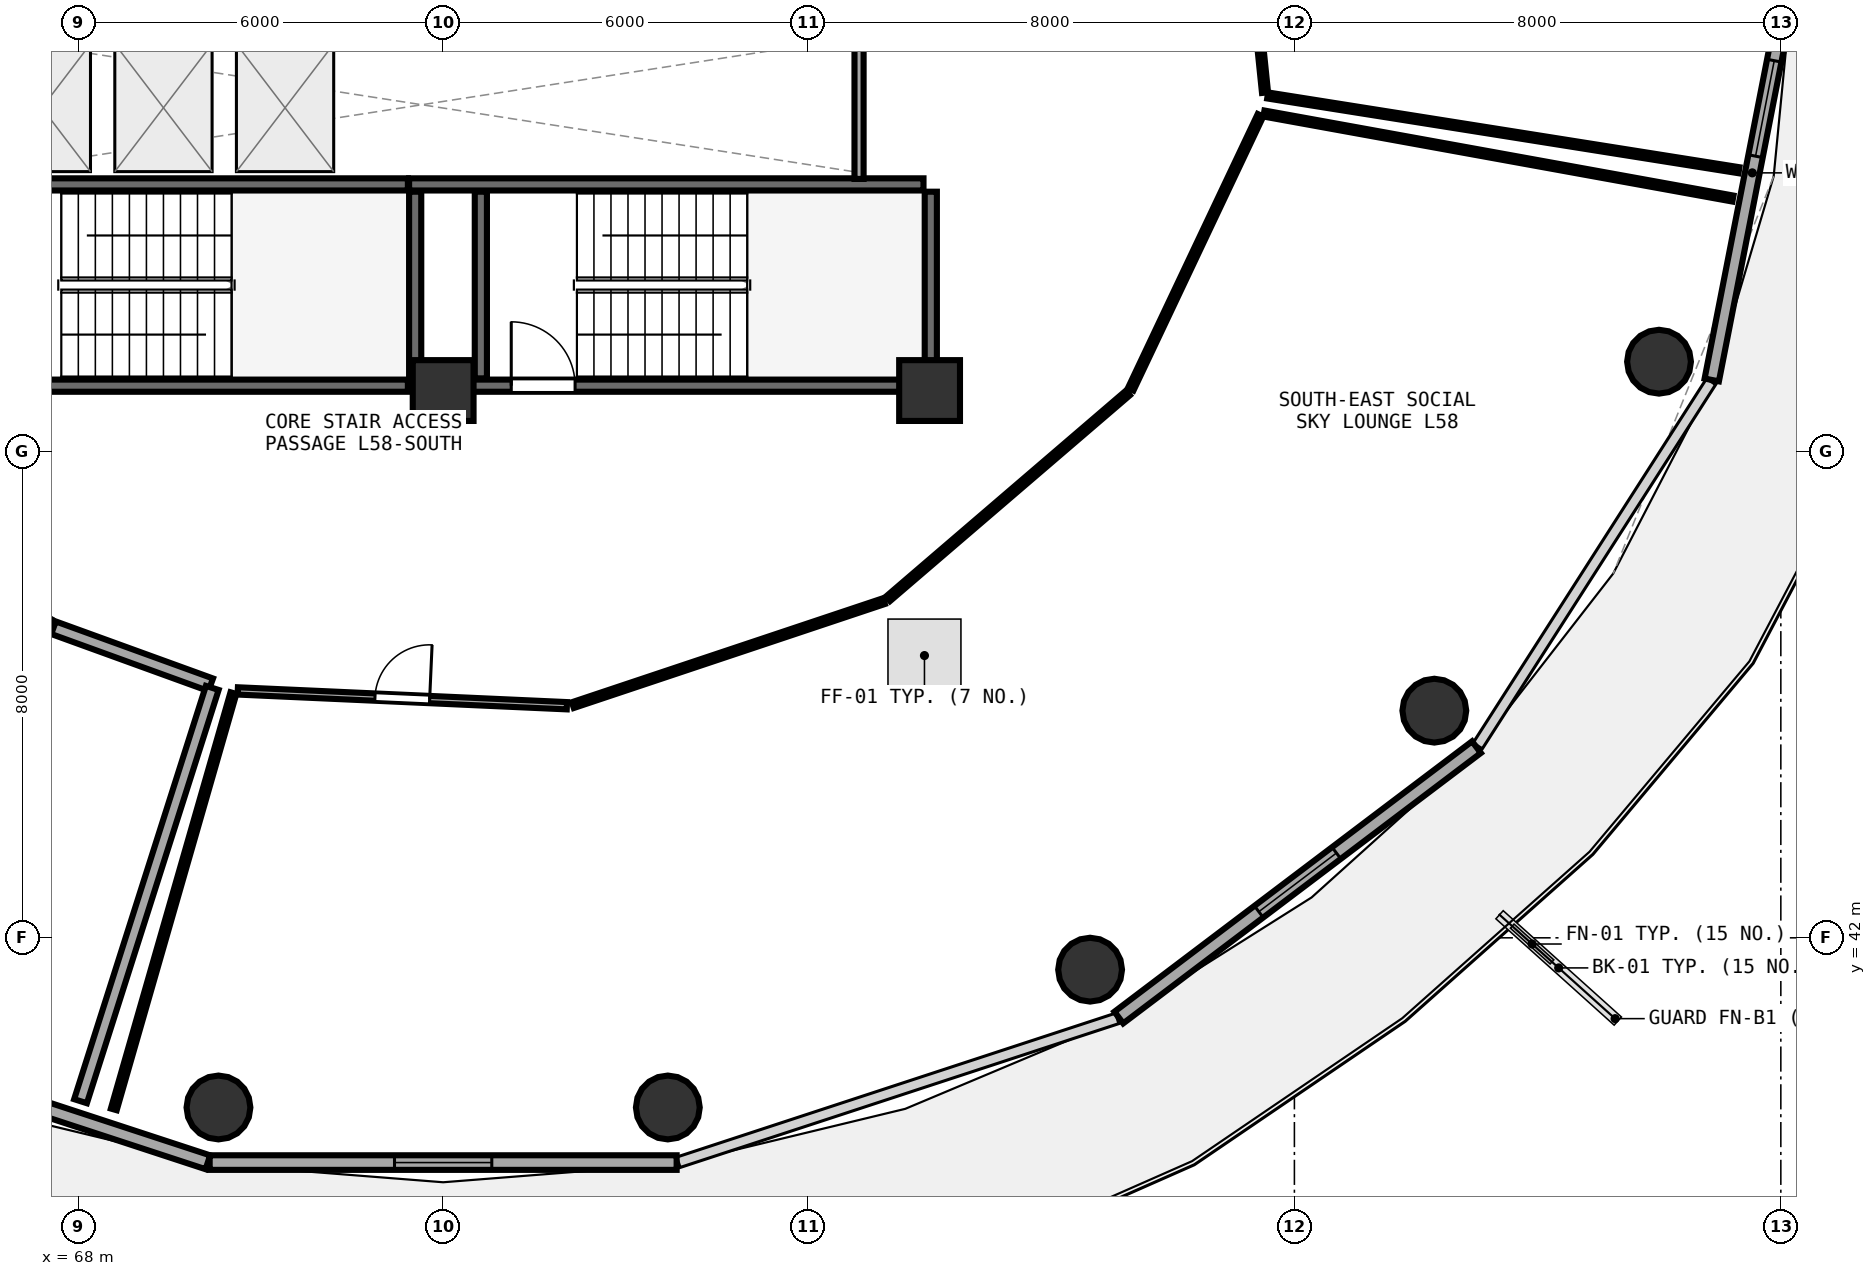
"""IFC4 building model, lengths in metres.
Left out: names, types, materials, properties, quantities, classifications, styles, units other than length and angle.
Written with IfcOpenShell. Run it as: python <this file> out.ifc"""

import sys

from ifc_helpers import new_model, si_unit, direction, frame, frame_2d, origin, origin_2d, place, context, subcontext, project, spatial, rectangle, circle, extrude, element, fill, save


model = new_model("IFC4")
c1 = context("Model", 3, precision=1e-05, world=origin(), true_north=direction((0.0, 1.0)))
c2 = subcontext(c1, "Body", "Model", "MODEL_VIEW")
j1 = project(units=[si_unit("LENGTHUNIT", "METRE"), si_unit("PLANEANGLEUNIT", "RADIAN")], contexts=[c1])
p1 = place(None, origin())
s1 = spatial("IfcSite", under=j1, at=p1, CompositionType="ELEMENT")
p2 = place(p1, origin())
s2 = spatial("IfcBuilding", under=s1, at=p2, CompositionType="ELEMENT")
p3 = place(p2, frame((0.0, 0.0, 226.95)))
s3 = spatial("IfcBuildingStorey", under=s2, at=p3, CompositionType="ELEMENT", Elevation=226.95)
for number, where, z_axis, x_axis in (
    (1, (74.0, 51.0, 0.0), (0.0, 0.0, 1.0), (1.0, 0.0, 0.0)),
    (2, (82.0, 51.0, 0.0), (0.0, 0.0, 1.0), (1.0, 0.0, 0.0)),
):
    element("IfcColumn", number, at=place(p3, frame(where, z_axis=z_axis, x_axis=x_axis)), inside=s3, PredefinedType="PILASTER", context=c2, shape_type="SweptSolid", body=[
        extrude(rectangle(XDim=1.0, YDim=1.0, at=origin_2d()), origin(), (0.0, 0.0, 1.0), 3.75),
    ])
for number, where, z_axis, x_axis in (
    (3, (70.305, 39.21, 0.0), (0.0, 0.0, 1.0), (1.0, 0.0, 0.0)),
    (4, (77.695, 39.21, 0.0), (0.0, 0.0, 1.0), (1.0, 0.0, 0.0)),
    (5, (84.64, 41.476, 0.0), (0.0, 0.0, 1.0), (1.0, 0.0, 0.0)),
    (6, (90.302, 45.736, 0.0), (0.0, 0.0, 1.0), (1.0, 0.0, 0.0)),
    (7, (93.997, 51.474, 0.0), (0.0, 0.0, 1.0), (1.0, 0.0, 0.0)),
):
    element("IfcColumn", number, at=place(p3, frame(where, z_axis=z_axis, x_axis=x_axis)), inside=s3, PredefinedType="COLUMN", context=c2, shape_type="SweptSolid", body=[
        extrude(circle(Radius=0.525, at=origin_2d()), origin(), (0.0, 0.0, 1.0), 3.75),
    ])
p4 = place(p3, frame((62.914, 40.675, 0.0), z_axis=(0.0, 0.0, 1.0), x_axis=(0.95022142767, -0.31157541366, 0.0)))
e8 = element("IfcWall", 8, at=p4, inside=s3, PredefinedType="SOLIDWALL", context=c2, shape_type="SweptSolid", body=[
    extrude(rectangle(XDim=7.594, YDim=0.24, at=frame_2d((3.797, 0.0))), origin(), (0.0, 0.0, 1.0), 3.475),
])
p5 = place(p4, frame((2.997, 0.0, 0.85)))
e9 = element("IfcOpeningElement", 9, at=p5, cuts=e8, PredefinedType="OPENING", context=c2, shape_type="SweptSolid", body=[
    extrude(rectangle(XDim=1.6, YDim=1.45, at=frame_2d((0.8, 0.725))), frame((0.0, 0.13, 0.0), z_axis=(0.0, -1.0, 0.0), x_axis=(1.0, 0.0, 0.0)), (0.0, 0.0, 1.0), 0.26),
])
p6 = place(p3, frame((70.16, 38.304, 0.0), z_axis=(0.0, 0.0, 1.0), x_axis=(1.0, 0.0, 0.0)))
e10 = element("IfcWall", 10, at=p6, inside=s3, PredefinedType="SOLIDWALL", context=c2, shape_type="SweptSolid", body=[
    extrude(rectangle(XDim=7.68, YDim=0.24, at=frame_2d((3.84, 0.0))), origin(), (0.0, 0.0, 1.0), 3.475),
])
p7 = place(p6, frame((3.04, 0.0, 0.85)))
e11 = element("IfcOpeningElement", 11, at=p7, cuts=e10, PredefinedType="OPENING", context=c2, shape_type="SweptSolid", body=[
    extrude(rectangle(XDim=1.6, YDim=1.45, at=frame_2d((0.8, 0.725))), frame((0.0, 0.13, 0.0), z_axis=(0.0, -1.0, 0.0), x_axis=(1.0, 0.0, 0.0)), (0.0, 0.0, 1.0), 0.26),
])
p8 = place(p3, frame((85.112, 40.688, 0.0), z_axis=(0.0, 0.0, 1.0), x_axis=(0.797701674595, 0.603052268338, 0.0)))
e12 = element("IfcWall", 12, at=p8, inside=s3, PredefinedType="SOLIDWALL", context=c2, shape_type="SweptSolid", body=[
    extrude(rectangle(XDim=7.374, YDim=0.24, at=frame_2d((3.687, 0.0))), origin(), (0.0, 0.0, 1.0), 3.475),
])
p9 = place(p8, frame((2.887, 0.0, 0.85)))
e13 = element("IfcOpeningElement", 13, at=p9, cuts=e12, PredefinedType="OPENING", context=c2, shape_type="SweptSolid", body=[
    extrude(rectangle(XDim=1.6, YDim=1.45, at=frame_2d((0.8, 0.725))), frame((0.0, 0.13, 0.0), z_axis=(0.0, -1.0, 0.0), x_axis=(1.0, 0.0, 0.0)), (0.0, 0.0, 1.0), 0.26),
])
p10 = place(p3, frame((94.864, 51.174, 0.0), z_axis=(0.0, 0.0, 1.0), x_axis=(0.192069055673, 0.981381413036, 0.0)))
e14 = element("IfcWall", 14, at=p10, inside=s3, PredefinedType="SOLIDWALL", context=c2, shape_type="SweptSolid", body=[
    extrude(rectangle(XDim=6.94, YDim=0.24, at=frame_2d((3.47, 0.0))), origin(), (0.0, 0.0, 1.0), 3.475),
])
p11 = place(p10, frame((3.75, 0.0, 0.85)))
e15 = element("IfcOpeningElement", 15, at=p11, cuts=e14, PredefinedType="OPENING", context=c2, shape_type="SweptSolid", body=[
    extrude(rectangle(XDim=1.6, YDim=1.45, at=frame_2d((0.8, 0.725))), frame((0.0, 0.13, 0.0), z_axis=(0.0, -1.0, 0.0), x_axis=(1.0, 0.0, 0.0)), (0.0, 0.0, 1.0), 0.26),
])
p12 = place(p3, frame((74.0, 51.08, 0.0), z_axis=(0.0, 0.0, 1.0), x_axis=(1.0, 0.0, 0.0)))
e16 = element("IfcWall", 16, at=p12, inside=s3, PredefinedType="SHEAR", context=c2, shape_type="SweptSolid", body=[
    extrude(rectangle(XDim=7.9, YDim=0.2, at=frame_2d((3.95, 0.0))), origin(), (0.0, 0.0, 1.0), 3.49),
])
p13 = place(p12, frame((1.12, 0.0, 0.0)))
e17 = element("IfcOpeningElement", 17, at=p13, cuts=e16, PredefinedType="OPENING", context=c2, shape_type="SweptSolid", body=[
    extrude(rectangle(XDim=1.05, YDim=2.1, at=frame_2d((0.525, 1.05))), frame((0.0, 0.11, 0.0), z_axis=(0.0, -1.0, 0.0), x_axis=(1.0, 0.0, 0.0)), (0.0, 0.0, 1.0), 0.22),
])
p14 = place(p3, frame((82.02, 51.2, 0.0), z_axis=(0.0, 0.0, 1.0), x_axis=(0.0, 1.0, 0.0)))
e18 = element("IfcWall", 18, at=p14, inside=s3, PredefinedType="SHEAR", context=c2, shape_type="SweptSolid", body=[
    extrude(rectangle(XDim=3.07, YDim=0.2, at=frame_2d((1.535, 0.0))), origin(), (0.0, 0.0, 1.0), 3.49),
])
p15 = place(p3, frame((81.9, 54.39, 0.0), z_axis=(0.0, 0.0, 1.0), x_axis=(-1.0, 0.0, 0.0)))
e19 = element("IfcWall", 19, at=p15, inside=s3, PredefinedType="SHEAR", context=c2, shape_type="SweptSolid", body=[
    extrude(rectangle(XDim=8.46, YDim=0.2, at=frame_2d((4.23, 0.0))), origin(), (0.0, 0.0, 1.0), 3.49),
])
p16 = place(p3, frame((74.62, 54.27, 0.0), z_axis=(0.0, 0.0, 1.0), x_axis=(0.0, -1.0, 0.0)))
e20 = element("IfcWall", 20, at=p16, inside=s3, PredefinedType="SHEAR", context=c2, shape_type="SweptSolid", body=[
    extrude(rectangle(XDim=3.07, YDim=0.2, at=frame_2d((1.535, 0.0))), origin(), (0.0, 0.0, 1.0), 3.49),
])
p17 = place(p3, frame((66.26, 51.08, 0.0), z_axis=(0.0, 0.0, 1.0), x_axis=(1.0, 0.0, 0.0)))
e21 = element("IfcWall", 21, at=p17, inside=s3, PredefinedType="SHEAR", context=c2, shape_type="SweptSolid", body=[
    extrude(rectangle(XDim=7.16, YDim=0.2, at=frame_2d((3.58, 0.0))), origin(), (0.0, 0.0, 1.0), 3.49),
])
p18 = place(p3, frame((73.54, 51.2, 0.0), z_axis=(0.0, 0.0, 1.0), x_axis=(0.0, 1.0, 0.0)))
e22 = element("IfcWall", 22, at=p18, inside=s3, PredefinedType="SHEAR", context=c2, shape_type="SweptSolid", body=[
    extrude(rectangle(XDim=3.07, YDim=0.2, at=frame_2d((1.535, 0.0))), origin(), (0.0, 0.0, 1.0), 3.49),
])
p19 = place(p3, frame((73.42, 54.39, 0.0), z_axis=(0.0, 0.0, 1.0), x_axis=(-1.0, 0.0, 0.0)))
e23 = element("IfcWall", 23, at=p19, inside=s3, PredefinedType="SHEAR", context=c2, shape_type="SweptSolid", body=[
    extrude(rectangle(XDim=7.16, YDim=0.2, at=frame_2d((3.58, 0.0))), origin(), (0.0, 0.0, 1.0), 3.49),
])
p20 = place(p3, frame((80.84, 54.48, 0.0), z_axis=(0.0, 0.0, 1.0), x_axis=(0.0, 1.0, 0.0)))
e24 = element("IfcWall", 24, at=p20, inside=s3, PredefinedType="PARTITIONING", context=c2, shape_type="SweptSolid", body=[
    extrude(rectangle(XDim=2.29, YDim=0.15, at=frame_2d((1.145, 0.0))), origin(), (0.0, 0.0, 1.0), 3.48),
])
p21 = place(p3, frame((70.622, 46.06, 0.0), z_axis=(0.0, 0.0, 1.0), x_axis=(0.998988600078, -0.044964173674, 0.0)))
e25 = element("IfcWall", 25, at=p21, inside=s3, PredefinedType="PARTITIONING", context=c2, shape_type="SweptSolid", body=[
    extrude(rectangle(XDim=5.419, YDim=0.12, at=frame_2d((2.709, 0.0))), origin(), (0.0, 0.0, 1.0), 3.025),
])
p22 = place(p21, frame((2.259, 0.0, 0.0)))
e26 = element("IfcOpeningElement", 26, at=p22, cuts=e25, PredefinedType="OPENING", context=c2, shape_type="SweptSolid", body=[
    extrude(rectangle(XDim=0.9, YDim=2.08, at=frame_2d((0.45, 1.04))), frame((0.0, 0.07, 0.0), z_axis=(0.0, -1.0, 0.0), x_axis=(1.0, 0.0, 0.0)), (0.0, 0.0, 1.0), 0.14),
])
p23 = place(p3, frame((67.592, 47.099, 0.0), z_axis=(0.0, 0.0, 1.0), x_axis=(0.940096246947, -0.340909146953, 0.0)))
e27 = element("IfcWall", 27, at=p23, inside=s3, PredefinedType="SOLIDWALL", context=c2, shape_type="SweptSolid", body=[
    extrude(rectangle(XDim=2.751, YDim=0.22, at=frame_2d((1.375, 0.0))), origin(), (0.0, 0.0, 1.0), 3.235),
])
p24 = place(p3, frame((70.203, 46.11, 0.0), z_axis=(0.0, 0.0, 1.0), x_axis=(-0.303726261943, -0.952759338871, 0.0)))
e28 = element("IfcWall", 28, at=p24, inside=s3, PredefinedType="SOLIDWALL", context=c2, shape_type="SweptSolid", body=[
    extrude(rectangle(XDim=7.134, YDim=0.22, at=frame_2d((3.567, 0.0))), origin(), (0.0, 0.0, 1.0), 3.075),
])
p25 = place(p3, frame((76.133, 45.827, 0.0), z_axis=(0.0, 0.0, 1.0), x_axis=(0.948424962871, 0.317001718928, 0.0)))
e29 = element("IfcWall", 29, at=p25, inside=s3, PredefinedType="PARTITIONING", context=c2, shape_type="SweptSolid", body=[
    extrude(rectangle(XDim=5.393, YDim=0.1, at=frame_2d((2.697, 0.0))), origin(), (0.0, 0.0, 1.0), 3.235),
])
p26 = place(p3, frame((81.316, 47.575, 0.0), z_axis=(0.0, 0.0, 1.0), x_axis=(0.758934846266, 0.651166567879, 0.0)))
e30 = element("IfcWall", 30, at=p26, inside=s3, PredefinedType="PARTITIONING", context=c2, shape_type="SweptSolid", body=[
    extrude(rectangle(XDim=5.197, YDim=0.1, at=frame_2d((2.598, 0.0))), origin(), (0.0, 0.0, 1.0), 3.025),
])
p27 = place(p3, frame((85.308, 51.021, 0.0), z_axis=(0.0, 0.0, 1.0), x_axis=(0.428012664174, 0.903772736537, 0.0)))
e31 = element("IfcWall", 31, at=p27, inside=s3, PredefinedType="PARTITIONING", context=c2, shape_type="SweptSolid", body=[
    extrude(rectangle(XDim=4.985, YDim=0.1, at=frame_2d((2.493, 0.0))), origin(), (0.0, 0.0, 1.0), 3.025),
])
p28 = place(p3, frame((87.498, 55.556, 0.0), z_axis=(0.0, 0.0, 1.0), x_axis=(0.983952512008, -0.178430530217, 0.0)))
e32 = element("IfcWall", 32, at=p28, inside=s3, PredefinedType="PARTITIONING", context=c2, shape_type="SweptSolid", body=[
    extrude(rectangle(XDim=7.84, YDim=0.1, at=frame_2d((3.92, 0.0))), origin(), (0.0, 0.0, 1.0), 3.075),
])
p29 = place(p3, frame((68.583, 39.178, 0.0), z_axis=(0.0, 0.0, 1.0), x_axis=(0.27624173688, 0.961088186799, 0.0)))
e33 = element("IfcWall", 33, at=p29, inside=s3, PredefinedType="PARTITIONING", context=c2, shape_type="SweptSolid", body=[
    extrude(rectangle(XDim=7.123, YDim=0.1, at=frame_2d((3.562, 0.0))), origin(), (0.0, 0.0, 1.0), 3.075),
])
p30 = place(p3, frame((87.517, 55.899, 0.0), z_axis=(0.0, 0.0, 1.0), x_axis=(-0.101648252044, 0.994820402312, 0.0)))
e34 = element("IfcWall", 34, at=p30, inside=s3, PredefinedType="PARTITIONING", context=c2, shape_type="SweptSolid", body=[
    extrude(rectangle(XDim=6.413, YDim=0.1, at=frame_2d((3.207, 0.0))), origin(), (0.0, 0.0, 1.0), 3.025),
])
p31 = place(p3, frame((95.312, 54.623, 0.0), z_axis=(0.0, 0.0, 1.0), x_axis=(-0.987651731417, 0.156665431505, 0.0)))
e35 = element("IfcWall", 35, at=p31, inside=s3, PredefinedType="PARTITIONING", context=c2, shape_type="SweptSolid", body=[
    extrude(rectangle(XDim=7.848, YDim=0.1, at=frame_2d((3.924, 0.0))), origin(), (0.0, 0.0, 1.0), 3.075),
])
p32 = place(p7, origin())
e36 = element("IfcWindow", 36, at=p32, inside=s3, PartitioningType="SINGLE_PANEL", PredefinedType="WINDOW", context=c2, shape_type="SweptSolid", body=[
    extrude(rectangle(XDim=1.6, YDim=1.45, at=frame_2d((0.8, 0.725))), frame((0.0, 0.03, 0.0), z_axis=(0.0, -1.0, 0.0), x_axis=(1.0, 0.0, 0.0)), (0.0, 0.0, 1.0), 0.06),
])
fill(e11, e36)
p33 = place(p9, origin())
e37 = element("IfcWindow", 37, at=p33, inside=s3, PartitioningType="SINGLE_PANEL", PredefinedType="WINDOW", context=c2, shape_type="SweptSolid", body=[
    extrude(rectangle(XDim=1.6, YDim=1.45, at=frame_2d((0.8, 0.725))), frame((0.0, 0.03, 0.0), z_axis=(0.0, -1.0, 0.0), x_axis=(1.0, 0.0, 0.0)), (0.0, 0.0, 1.0), 0.06),
])
fill(e13, e37)
p34 = place(p11, origin())
e38 = element("IfcWindow", 38, at=p34, inside=s3, PartitioningType="SINGLE_PANEL", PredefinedType="WINDOW", context=c2, shape_type="SweptSolid", body=[
    extrude(rectangle(XDim=1.6, YDim=1.45, at=frame_2d((0.8, 0.725))), frame((0.0, 0.03, 0.0), z_axis=(0.0, -1.0, 0.0), x_axis=(1.0, 0.0, 0.0)), (0.0, 0.0, 1.0), 0.06),
])
fill(e15, e38)
p35 = place(p13, origin())
e39 = element("IfcDoor", 39, at=p35, inside=s3, OperationType="SINGLE_SWING_LEFT", PredefinedType="DOOR", context=c2, shape_type="SweptSolid", body=[
    extrude(rectangle(XDim=1.05, YDim=2.1, at=frame_2d((0.525, 1.05))), frame((0.0, 0.025, 0.0), z_axis=(0.0, -1.0, 0.0), x_axis=(1.0, 0.0, 0.0)), (0.0, 0.0, 1.0), 0.05),
])
fill(e17, e39)
p36 = place(p22, origin())
e40 = element("IfcDoor", 40, at=p36, inside=s3, OperationType="SINGLE_SWING_RIGHT", PredefinedType="DOOR", context=c2, shape_type="SweptSolid", body=[
    extrude(rectangle(XDim=0.9, YDim=2.08, at=frame_2d((0.45, 1.04))), frame((0.0, 0.025, 0.0), z_axis=(0.0, -1.0, 0.0), x_axis=(1.0, 0.0, 0.0)), (0.0, 0.0, 1.0), 0.05),
])
fill(e26, e40)
save(model, sys.argv[1])
